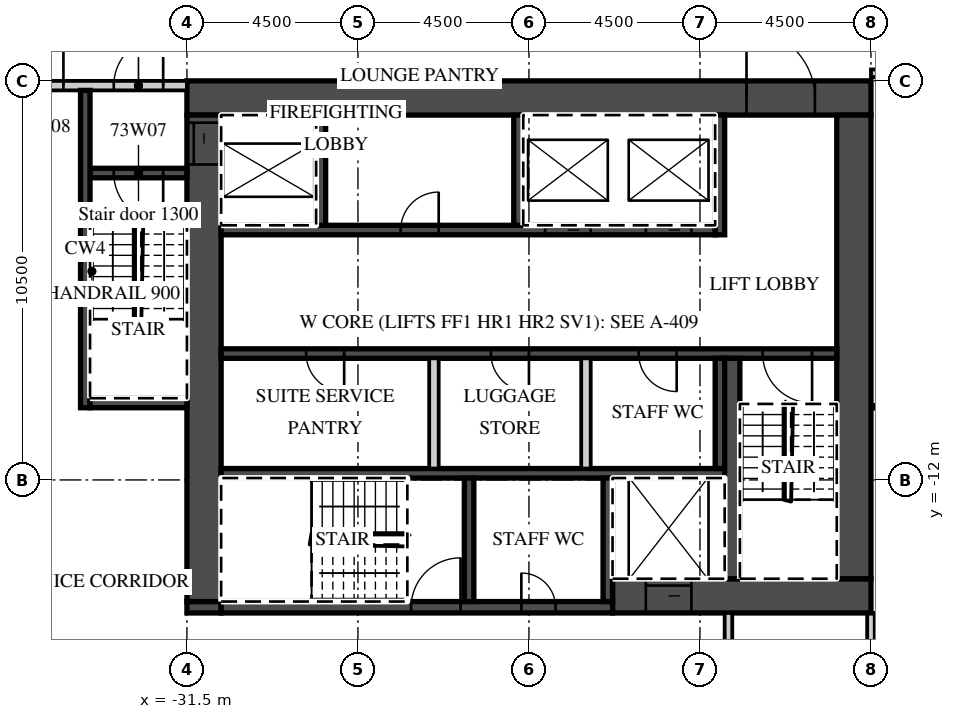
"""IFC4 building model, lengths in metres.
Left out: names, types, materials, properties, quantities, classifications, styles, units other than length and angle.
Written with IfcOpenShell. Run it as: python <this file> out.ifc"""

import sys

from ifc_helpers import new_model, si_unit, direction, frame, frame_2d, origin, place, context, subcontext, project, spatial, rectangle, extrude, element, fill, save


model = new_model("IFC4")
c1 = context("Model", 3, precision=1e-05, world=origin(), true_north=direction((0.0, 1.0)))
c2 = subcontext(c1, "Body", "Model", "MODEL_VIEW")
j1 = project(units=[si_unit("LENGTHUNIT", "METRE"), si_unit("PLANEANGLEUNIT", "RADIAN")], contexts=[c1])
p1 = place(None, origin())
s1 = spatial("IfcSite", under=j1, at=p1, CompositionType="ELEMENT")
p2 = place(p1, origin())
s2 = spatial("IfcBuilding", under=s1, at=p2, CompositionType="ELEMENT")
p3 = place(p2, frame((0.0, 0.0, 291.6)))
s3 = spatial("IfcBuildingStorey", under=s2, at=p3, CompositionType="ELEMENT", Elevation=291.6)
p4 = place(p3, frame((-13.5, -21.396, 0.0), z_axis=(0.0, 0.0, 1.0), x_axis=(0.0, 1.0, 0.0)))
e1 = element("IfcWall", 1, at=p4, inside=s3, PredefinedType="PARTITIONING", context=c2, shape_type="SweptSolid", body=[
    extrude(rectangle(XDim=5.896, YDim=0.2, at=frame_2d((2.948, 0.0))), origin(), (0.0, 0.0, 1.0), 3.02),
])
p5 = place(p3, frame((-13.5, -1.3, 0.0), z_axis=(0.0, 0.0, 1.0), x_axis=(1.0, 0.0, 0.0)))
e2 = element("IfcWall", 2, at=p5, inside=s3, PredefinedType="PARTITIONING", context=c2, shape_type="SweptSolid", body=[
    extrude(rectangle(XDim=50.293, YDim=0.2, at=frame_2d((25.146, 0.0))), origin(), (0.0, 0.0, 1.0), 3.02),
])
p6 = place(p5, frame((0.575, 0.0, 0.0)))
e3 = element("IfcOpeningElement", 3, at=p6, cuts=e2, PredefinedType="OPENING", context=c2, shape_type="SweptSolid", body=[
    extrude(rectangle(XDim=1.0, YDim=2.1, at=frame_2d((0.5, 1.05))), frame((0.0, 0.11, 0.0), z_axis=(0.0, -1.0, 0.0), x_axis=(1.0, 0.0, 0.0)), (0.0, 0.0, 1.0), 0.22),
])
p7 = place(p5, frame((9.863, 0.0, 0.0)))
e4 = element("IfcOpeningElement", 4, at=p7, cuts=e2, PredefinedType="OPENING", context=c2, shape_type="SweptSolid", body=[
    extrude(rectangle(XDim=1.2, YDim=2.1, at=frame_2d((0.6, 1.05))), frame((0.0, 0.11, 0.0), z_axis=(0.0, -1.0, 0.0), x_axis=(1.0, 0.0, 0.0)), (0.0, 0.0, 1.0), 0.22),
])
p8 = place(p5, frame((18.862, 0.0, 0.0)))
e5 = element("IfcOpeningElement", 5, at=p8, cuts=e2, PredefinedType="OPENING", context=c2, shape_type="SweptSolid", body=[
    extrude(rectangle(XDim=1.2, YDim=2.1, at=frame_2d((0.6, 1.05))), frame((0.0, 0.11, 0.0), z_axis=(0.0, -1.0, 0.0), x_axis=(1.0, 0.0, 0.0)), (0.0, 0.0, 1.0), 0.22),
])
p9 = place(p5, frame((25.45, 0.0, 0.0)))
e6 = element("IfcOpeningElement", 6, at=p9, cuts=e2, PredefinedType="OPENING", context=c2, shape_type="SweptSolid", body=[
    extrude(rectangle(XDim=1.0, YDim=2.1, at=frame_2d((0.5, 1.05))), frame((0.0, 0.11, 0.0), z_axis=(0.0, -1.0, 0.0), x_axis=(1.0, 0.0, 0.0)), (0.0, 0.0, 1.0), 0.22),
])
p10 = place(p5, frame((27.55, 0.0, 0.0)))
e7 = element("IfcOpeningElement", 7, at=p10, cuts=e2, PredefinedType="OPENING", context=c2, shape_type="SweptSolid", body=[
    extrude(rectangle(XDim=1.0, YDim=2.1, at=frame_2d((0.5, 1.05))), frame((0.0, 0.11, 0.0), z_axis=(0.0, -1.0, 0.0), x_axis=(1.0, 0.0, 0.0)), (0.0, 0.0, 1.0), 0.22),
])
p11 = place(p5, frame((33.938, 0.0, 0.0)))
e8 = element("IfcOpeningElement", 8, at=p11, cuts=e2, PredefinedType="OPENING", context=c2, shape_type="SweptSolid", body=[
    extrude(rectangle(XDim=1.2, YDim=2.1, at=frame_2d((0.6, 1.05))), frame((0.0, 0.11, 0.0), z_axis=(0.0, -1.0, 0.0), x_axis=(1.0, 0.0, 0.0)), (0.0, 0.0, 1.0), 0.22),
])
p12 = place(p5, frame((42.938, 0.0, 0.0)))
e9 = element("IfcOpeningElement", 9, at=p12, cuts=e2, PredefinedType="OPENING", context=c2, shape_type="SweptSolid", body=[
    extrude(rectangle(XDim=1.2, YDim=2.1, at=frame_2d((0.6, 1.05))), frame((0.0, 0.11, 0.0), z_axis=(0.0, -1.0, 0.0), x_axis=(1.0, 0.0, 0.0)), (0.0, 0.0, 1.0), 0.22),
])
p13 = place(p3, frame((-31.5, -1.95, 0.0), z_axis=(0.0, 0.0, 1.0), x_axis=(1.0, 0.0, 0.0)))
e10 = element("IfcWall", 10, at=p13, inside=s3, PredefinedType="SHEAR", context=c2, shape_type="SweptSolid", body=[
    extrude(rectangle(XDim=18.0, YDim=0.9, at=frame_2d((9.0, 0.0))), origin(), (0.0, 0.0, 1.0), 3.02),
])
p14 = place(p13, frame((14.725, 0.0, 0.0)))
e11 = element("IfcOpeningElement", 11, at=p14, cuts=e10, PredefinedType="OPENING", context=c2, shape_type="SweptSolid", body=[
    extrude(rectangle(XDim=1.8, YDim=2.1, at=frame_2d((0.9, 1.05))), frame((0.0, 0.46, 0.0), z_axis=(0.0, -1.0, 0.0), x_axis=(1.0, 0.0, 0.0)), (0.0, 0.0, 1.0), 0.92),
])
p15 = place(p3, frame((-20.3, -15.05, 0.0), z_axis=(0.0, 0.0, 1.0), x_axis=(1.0, 0.0, 0.0)))
e12 = element("IfcWall", 12, at=p15, inside=s3, PredefinedType="SHEAR", context=c2, shape_type="SweptSolid", body=[
    extrude(rectangle(XDim=6.8, YDim=0.9, at=frame_2d((3.4, 0.0))), origin(), (0.0, 0.0, 1.0), 3.02),
])
p16 = place(p15, frame((0.875, 0.0, 0.0)))
e13 = element("IfcOpeningElement", 13, at=p16, cuts=e12, PredefinedType="OPENING", context=c2, shape_type="SweptSolid", body=[
    extrude(rectangle(XDim=1.2, YDim=2.1, at=frame_2d((0.6, 1.05))), frame((0.0, 0.46, 0.0), z_axis=(0.0, -1.0, 0.0), x_axis=(1.0, 0.0, 0.0)), (0.0, 0.0, 1.0), 0.92),
])
p17 = place(p3, frame((-31.5, -15.35, 0.0), z_axis=(0.0, 0.0, 1.0), x_axis=(1.0, 0.0, 0.0)))
e14 = element("IfcWall", 14, at=p17, inside=s3, PredefinedType="SHEAR", context=c2, shape_type="SweptSolid", body=[
    extrude(rectangle(XDim=0.9, YDim=0.3, at=frame_2d((0.45, 0.0))), origin(), (0.0, 0.0, 1.0), 3.02),
])
p18 = place(p3, frame((-30.6, -15.35, 0.0), z_axis=(0.0, 0.0, 1.0), x_axis=(1.0, 0.0, 0.0)))
e15 = element("IfcWall", 15, at=p18, inside=s3, PredefinedType="SHEAR", context=c2, shape_type="SweptSolid", body=[
    extrude(rectangle(XDim=10.3, YDim=0.3, at=frame_2d((5.15, 0.0))), origin(), (0.0, 0.0, 1.0), 3.02),
])
p19 = place(p18, frame((5.0, 0.0, 0.0)))
e16 = element("IfcOpeningElement", 16, at=p19, cuts=e15, PredefinedType="OPENING", context=c2, shape_type="SweptSolid", body=[
    extrude(rectangle(XDim=1.3, YDim=2.1, at=frame_2d((0.65, 1.05))), frame((0.0, 0.16, 0.0), z_axis=(0.0, -1.0, 0.0), x_axis=(1.0, 0.0, 0.0)), (0.0, 0.0, 1.0), 0.32),
])
p20 = place(p18, frame((7.9, 0.0, 0.0)))
e17 = element("IfcOpeningElement", 17, at=p20, cuts=e15, PredefinedType="OPENING", context=c2, shape_type="SweptSolid", body=[
    extrude(rectangle(XDim=0.9, YDim=2.1, at=frame_2d((0.45, 1.05))), frame((0.0, 0.16, 0.0), z_axis=(0.0, -1.0, 0.0), x_axis=(1.0, 0.0, 0.0)), (0.0, 0.0, 1.0), 0.32),
])
p21 = place(p3, frame((-31.05, -15.2, 0.0), z_axis=(0.0, 0.0, 1.0), x_axis=(0.0, 1.0, 0.0)))
e18 = element("IfcWall", 18, at=p21, inside=s3, PredefinedType="SHEAR", context=c2, shape_type="SweptSolid", body=[
    extrude(rectangle(XDim=12.8, YDim=0.9, at=frame_2d((6.4, 0.0))), origin(), (0.0, 0.0, 1.0), 3.02),
])
p22 = place(p21, frame((11.5, 0.0, 0.0)))
e19 = element("IfcOpeningElement", 19, at=p22, cuts=e18, PredefinedType="OPENING", context=c2, shape_type="SweptSolid", body=[
    extrude(rectangle(XDim=1.1, YDim=2.1, at=frame_2d((0.55, 1.05))), frame((0.0, 0.46, 0.0), z_axis=(0.0, -1.0, 0.0), x_axis=(1.0, 0.0, 0.0)), (0.0, 0.0, 1.0), 0.92),
])
p23 = place(p3, frame((-13.95, -14.6, 0.0), z_axis=(0.0, 0.0, 1.0), x_axis=(0.0, 1.0, 0.0)))
e20 = element("IfcWall", 20, at=p23, inside=s3, PredefinedType="SHEAR", context=c2, shape_type="SweptSolid", body=[
    extrude(rectangle(XDim=12.2, YDim=0.9, at=frame_2d((6.1, 0.0))), origin(), (0.0, 0.0, 1.0), 3.02),
])
p24 = place(p3, frame((-30.6, -5.425, 0.0), z_axis=(0.0, 0.0, 1.0), x_axis=(1.0, 0.0, 0.0)))
e21 = element("IfcWall", 21, at=p24, inside=s3, PredefinedType="SHEAR", context=c2, shape_type="SweptSolid", body=[
    extrude(rectangle(XDim=13.0, YDim=0.25, at=frame_2d((6.5, 0.0))), origin(), (0.0, 0.0, 1.0), 3.02),
])
p25 = place(p24, frame((8.525, 0.0, 0.0)))
e22 = element("IfcOpeningElement", 22, at=p25, cuts=e21, PredefinedType="OPENING", context=c2, shape_type="SweptSolid", body=[
    extrude(rectangle(XDim=1.2, YDim=2.1, at=frame_2d((0.6, 1.05))), frame((0.0, 0.135, 0.0), z_axis=(0.0, -1.0, 0.0), x_axis=(1.0, 0.0, 0.0)), (0.0, 0.0, 1.0), 0.27),
])
p26 = place(p24, frame((11.175, 0.0, 0.0)))
e23 = element("IfcOpeningElement", 23, at=p26, cuts=e21, PredefinedType="OPENING", context=c2, shape_type="SweptSolid", body=[
    extrude(rectangle(XDim=1.2, YDim=2.1, at=frame_2d((0.6, 1.05))), frame((0.0, 0.135, 0.0), z_axis=(0.0, -1.0, 0.0), x_axis=(1.0, 0.0, 0.0)), (0.0, 0.0, 1.0), 0.27),
])
p27 = place(p24, frame((4.725, 0.0, 0.0)))
e24 = element("IfcOpeningElement", 24, at=p27, cuts=e21, PredefinedType="OPENING", context=c2, shape_type="SweptSolid", body=[
    extrude(rectangle(XDim=1.0, YDim=2.1, at=frame_2d((0.5, 1.05))), frame((0.0, 0.135, 0.0), z_axis=(0.0, -1.0, 0.0), x_axis=(1.0, 0.0, 0.0)), (0.0, 0.0, 1.0), 0.27),
])
p28 = place(p3, frame((-17.475, -5.55, 0.0), z_axis=(0.0, 0.0, 1.0), x_axis=(0.0, 1.0, 0.0)))
e25 = element("IfcWall", 25, at=p28, inside=s3, PredefinedType="SHEAR", context=c2, shape_type="SweptSolid", body=[
    extrude(rectangle(XDim=3.15, YDim=0.25, at=frame_2d((1.575, 0.0))), origin(), (0.0, 0.0, 1.0), 3.02),
])
for number, where, z_axis, x_axis in (
    (26, (-27.975, -5.3, 0.0), (0.0, 0.0, 1.0), (0.0, 1.0, 0.0)),
    (27, (-22.775, -5.3, 0.0), (0.0, 0.0, 1.0), (0.0, 1.0, 0.0)),
):
    element("IfcWall", number, at=place(p3, frame(where, z_axis=z_axis, x_axis=x_axis)), inside=s3, PredefinedType="SHEAR", context=c2, shape_type="SweptSolid", body=[
        extrude(rectangle(XDim=2.9, YDim=0.25, at=frame_2d((1.45, 0.0))), origin(), (0.0, 0.0, 1.0), 3.02),
    ])
p29 = place(p3, frame((-30.6, -8.675, 0.0), z_axis=(0.0, 0.0, 1.0), x_axis=(1.0, 0.0, 0.0)))
e28 = element("IfcWall", 28, at=p29, inside=s3, PredefinedType="SHEAR", context=c2, shape_type="SweptSolid", body=[
    extrude(rectangle(XDim=16.2, YDim=0.25, at=frame_2d((8.1, 0.0))), origin(), (0.0, 0.0, 1.0), 3.02),
])
p30 = place(p29, frame((14.25, 0.0, 0.0)))
e29 = element("IfcOpeningElement", 29, at=p30, cuts=e28, PredefinedType="OPENING", context=c2, shape_type="SweptSolid", body=[
    extrude(rectangle(XDim=1.3, YDim=2.1, at=frame_2d((0.65, 1.05))), frame((0.0, 0.135, 0.0), z_axis=(0.0, -1.0, 0.0), x_axis=(1.0, 0.0, 0.0)), (0.0, 0.0, 1.0), 0.27),
])
p31 = place(p29, frame((2.238, 0.0, 0.0)))
e30 = element("IfcOpeningElement", 30, at=p31, cuts=e28, PredefinedType="OPENING", context=c2, shape_type="SweptSolid", body=[
    extrude(rectangle(XDim=1.0, YDim=2.1, at=frame_2d((0.5, 1.05))), frame((0.0, 0.135, 0.0), z_axis=(0.0, -1.0, 0.0), x_axis=(1.0, 0.0, 0.0)), (0.0, 0.0, 1.0), 0.27),
])
p32 = place(p29, frame((7.1, 0.0, 0.0)))
e31 = element("IfcOpeningElement", 31, at=p32, cuts=e28, PredefinedType="OPENING", context=c2, shape_type="SweptSolid", body=[
    extrude(rectangle(XDim=1.0, YDim=2.1, at=frame_2d((0.5, 1.05))), frame((0.0, 0.135, 0.0), z_axis=(0.0, -1.0, 0.0), x_axis=(1.0, 0.0, 0.0)), (0.0, 0.0, 1.0), 0.27),
])
p33 = place(p29, frame((10.988, 0.0, 0.0)))
e32 = element("IfcOpeningElement", 32, at=p33, cuts=e28, PredefinedType="OPENING", context=c2, shape_type="SweptSolid", body=[
    extrude(rectangle(XDim=1.0, YDim=2.1, at=frame_2d((0.5, 1.05))), frame((0.0, 0.135, 0.0), z_axis=(0.0, -1.0, 0.0), x_axis=(1.0, 0.0, 0.0)), (0.0, 0.0, 1.0), 0.27),
])
p34 = place(p3, frame((-30.6, -11.825, 0.0), z_axis=(0.0, 0.0, 1.0), x_axis=(1.0, 0.0, 0.0)))
e33 = element("IfcWall", 33, at=p34, inside=s3, PredefinedType="SHEAR", context=c2, shape_type="SweptSolid", body=[
    extrude(rectangle(XDim=13.25, YDim=0.25, at=frame_2d((6.625, 0.0))), origin(), (0.0, 0.0, 1.0), 3.02),
])
p35 = place(p3, frame((-17.475, -11.7, 0.0), z_axis=(0.0, 0.0, 1.0), x_axis=(0.0, 1.0, 0.0)))
e34 = element("IfcWall", 34, at=p35, inside=s3, PredefinedType="SHEAR", context=c2, shape_type="SweptSolid", body=[
    extrude(rectangle(XDim=2.9, YDim=0.25, at=frame_2d((1.45, 0.0))), origin(), (0.0, 0.0, 1.0), 3.02),
])
for number, where, z_axis, x_axis in (
    (35, (-25.0, -11.7, 0.0), (0.0, 0.0, 1.0), (0.0, 1.0, 0.0)),
    (36, (-21.0, -11.7, 0.0), (0.0, 0.0, 1.0), (0.0, 1.0, 0.0)),
):
    element("IfcWall", number, at=place(p3, frame(where, z_axis=z_axis, x_axis=x_axis)), inside=s3, PredefinedType="PARTITIONING", context=c2, shape_type="SweptSolid", body=[
        extrude(rectangle(XDim=2.9, YDim=0.25, at=frame_2d((1.45, 0.0))), origin(), (0.0, 0.0, 1.0), 3.02),
    ])
p36 = place(p3, frame((-17.15, -14.6, 0.0), z_axis=(0.0, 0.0, 1.0), x_axis=(0.0, 1.0, 0.0)))
e37 = element("IfcWall", 37, at=p36, inside=s3, PredefinedType="SHEAR", context=c2, shape_type="SweptSolid", body=[
    extrude(rectangle(XDim=5.8, YDim=0.4, at=frame_2d((2.9, 0.0))), origin(), (0.0, 0.0, 1.0), 3.02),
])
for number, where, z_axis, x_axis in (
    (38, (-20.425, -15.2, 0.0), (0.0, 0.0, 1.0), (0.0, 1.0, 0.0)),
    (39, (-24.075, -15.2, 0.0), (0.0, 0.0, 1.0), (0.0, 1.0, 0.0)),
):
    element("IfcWall", number, at=place(p3, frame(where, z_axis=z_axis, x_axis=x_axis)), inside=s3, PredefinedType="SHEAR", context=c2, shape_type="SweptSolid", body=[
        extrude(rectangle(XDim=3.25, YDim=0.25, at=frame_2d((1.625, 0.0))), origin(), (0.0, 0.0, 1.0), 3.02),
    ])
p37 = place(p3, frame((-39.627, -1.625, 0.0), z_axis=(0.0, 0.0, 1.0), x_axis=(1.0, 0.0, 0.0)))
e40 = element("IfcWall", 40, at=p37, inside=s3, PredefinedType="PARTITIONING", context=c2, shape_type="SweptSolid", body=[
    extrude(rectangle(XDim=8.127, YDim=0.25, at=frame_2d((4.063, 0.0))), origin(), (0.0, 0.0, 1.0), 3.02),
])
p38 = place(p37, frame((6.202, 0.0, 0.0)))
e41 = element("IfcOpeningElement", 41, at=p38, cuts=e40, PredefinedType="OPENING", context=c2, shape_type="SweptSolid", body=[
    extrude(rectangle(XDim=1.3, YDim=2.1, at=frame_2d((0.65, 1.05))), frame((0.0, 0.135, 0.0), z_axis=(0.0, -1.0, 0.0), x_axis=(1.0, 0.0, 0.0)), (0.0, 0.0, 1.0), 0.27),
])
p39 = place(p37, frame((3.777, 0.0, 0.0)))
e42 = element("IfcOpeningElement", 42, at=p39, cuts=e40, PredefinedType="OPENING", context=c2, shape_type="SweptSolid", body=[
    extrude(rectangle(XDim=1.1, YDim=2.1, at=frame_2d((0.55, 1.05))), frame((0.0, 0.135, 0.0), z_axis=(0.0, -1.0, 0.0), x_axis=(1.0, 0.0, 0.0)), (0.0, 0.0, 1.0), 0.27),
])
p40 = place(p3, frame((-34.05, -3.925, 0.0), z_axis=(0.0, 0.0, 1.0), x_axis=(1.0, 0.0, 0.0)))
e43 = element("IfcWall", 43, at=p40, inside=s3, PredefinedType="SHEAR", context=c2, shape_type="SweptSolid", body=[
    extrude(rectangle(XDim=2.55, YDim=0.25, at=frame_2d((1.275, 0.0))), origin(), (0.0, 0.0, 1.0), 3.02),
])
p41 = place(p40, frame((0.625, 0.0, 0.0)))
e44 = element("IfcOpeningElement", 44, at=p41, cuts=e43, PredefinedType="OPENING", context=c2, shape_type="SweptSolid", body=[
    extrude(rectangle(XDim=1.3, YDim=2.1, at=frame_2d((0.65, 1.05))), frame((0.0, 0.135, 0.0), z_axis=(0.0, -1.0, 0.0), x_axis=(1.0, 0.0, 0.0)), (0.0, 0.0, 1.0), 0.27),
])
p42 = place(p3, frame((-34.175, -10.1, 0.0), z_axis=(0.0, 0.0, 1.0), x_axis=(0.0, 1.0, 0.0)))
e45 = element("IfcWall", 45, at=p42, inside=s3, PredefinedType="SHEAR", context=c2, shape_type="SweptSolid", body=[
    extrude(rectangle(XDim=8.35, YDim=0.25, at=frame_2d((4.175, 0.0))), origin(), (0.0, 0.0, 1.0), 3.02),
])
p43 = place(p3, frame((-34.05, -9.975, 0.0), z_axis=(0.0, 0.0, 1.0), x_axis=(1.0, 0.0, 0.0)))
e46 = element("IfcWall", 46, at=p43, inside=s3, PredefinedType="SHEAR", context=c2, shape_type="SweptSolid", body=[
    extrude(rectangle(XDim=2.55, YDim=0.25, at=frame_2d((1.275, 0.0))), origin(), (0.0, 0.0, 1.0), 3.02),
])
p44 = place(p3, frame((-17.25, -17.7, 0.0), z_axis=(0.0, 0.0, 1.0), x_axis=(0.0, 1.0, 0.0)))
e47 = element("IfcWall", 47, at=p44, inside=s3, PredefinedType="PARTITIONING", context=c2, shape_type="SweptSolid", body=[
    extrude(rectangle(XDim=2.2, YDim=0.2, at=frame_2d((1.1, 0.0))), origin(), (0.0, 0.0, 1.0), 3.02),
])
p45 = place(p25, origin())
e48 = element("IfcDoor", 48, at=p45, inside=s3, OperationType="SLIDING_TO_LEFT", PredefinedType="DOOR", context=c2, shape_type="SweptSolid", body=[
    extrude(rectangle(XDim=1.2, YDim=2.1, at=frame_2d((0.6, 1.05))), frame((0.0, 0.025, 0.0), z_axis=(0.0, -1.0, 0.0), x_axis=(1.0, 0.0, 0.0)), (0.0, 0.0, 1.0), 0.05),
])
fill(e22, e48)
p46 = place(p26, origin())
e49 = element("IfcDoor", 49, at=p46, inside=s3, OperationType="SLIDING_TO_RIGHT", PredefinedType="DOOR", context=c2, shape_type="SweptSolid", body=[
    extrude(rectangle(XDim=1.2, YDim=2.1, at=frame_2d((0.6, 1.05))), frame((0.0, 0.025, 0.0), z_axis=(0.0, -1.0, 0.0), x_axis=(1.0, 0.0, 0.0)), (0.0, 0.0, 1.0), 0.05),
])
fill(e23, e49)
p47 = place(p16, origin())
e50 = element("IfcDoor", 50, at=p47, inside=s3, OperationType="SLIDING_TO_LEFT", PredefinedType="DOOR", context=c2, shape_type="SweptSolid", body=[
    extrude(rectangle(XDim=1.2, YDim=2.1, at=frame_2d((0.6, 1.05))), frame((0.0, 0.025, 0.0), z_axis=(0.0, -1.0, 0.0), x_axis=(1.0, 0.0, 0.0)), (0.0, 0.0, 1.0), 0.05),
])
fill(e13, e50)
p48 = place(p22, origin())
e51 = element("IfcDoor", 51, at=p48, inside=s3, OperationType="SLIDING_TO_RIGHT", PredefinedType="DOOR", context=c2, shape_type="SweptSolid", body=[
    extrude(rectangle(XDim=1.1, YDim=2.1, at=frame_2d((0.55, 1.05))), frame((0.0, 0.025, 0.0), z_axis=(0.0, -1.0, 0.0), x_axis=(1.0, 0.0, 0.0)), (0.0, 0.0, 1.0), 0.05),
])
fill(e19, e51)
p49 = place(p14, origin())
e52 = element("IfcDoor", 52, at=p49, inside=s3, OperationType="DOUBLE_DOOR_DOUBLE_SWING", PredefinedType="DOOR", context=c2, shape_type="SweptSolid", body=[
    extrude(rectangle(XDim=1.8, YDim=2.1, at=frame_2d((0.9, 1.05))), frame((0.0, 0.025, 0.0), z_axis=(0.0, -1.0, 0.0), x_axis=(1.0, 0.0, 0.0)), (0.0, 0.0, 1.0), 0.05),
])
fill(e11, e52)
p50 = place(p38, origin())
e53 = element("IfcDoor", 53, at=p50, inside=s3, OperationType="SINGLE_SWING_RIGHT", PredefinedType="DOOR", context=c2, shape_type="SweptSolid", body=[
    extrude(rectangle(XDim=1.3, YDim=2.1, at=frame_2d((0.65, 1.05))), frame((0.0, 0.025, 0.0), z_axis=(0.0, -1.0, 0.0), x_axis=(1.0, 0.0, 0.0)), (0.0, 0.0, 1.0), 0.05),
])
fill(e41, e53)
p51 = place(p41, origin())
e54 = element("IfcDoor", 54, at=p51, inside=s3, OperationType="SINGLE_SWING_RIGHT", PredefinedType="DOOR", context=c2, shape_type="SweptSolid", body=[
    extrude(rectangle(XDim=1.3, YDim=2.1, at=frame_2d((0.65, 1.05))), frame((0.0, 0.025, 0.0), z_axis=(0.0, -1.0, 0.0), x_axis=(1.0, 0.0, 0.0)), (0.0, 0.0, 1.0), 0.05),
])
fill(e44, e54)
p52 = place(p39, origin())
e55 = element("IfcDoor", 55, at=p52, inside=s3, OperationType="SINGLE_SWING_RIGHT", PredefinedType="DOOR", context=c2, shape_type="SweptSolid", body=[
    extrude(rectangle(XDim=1.1, YDim=2.1, at=frame_2d((0.55, 1.05))), frame((0.0, 0.025, 0.0), z_axis=(0.0, -1.0, 0.0), x_axis=(1.0, 0.0, 0.0)), (0.0, 0.0, 1.0), 0.05),
])
fill(e42, e55)
p53 = place(p30, origin())
e56 = element("IfcDoor", 56, at=p53, inside=s3, OperationType="SINGLE_SWING_RIGHT", PredefinedType="DOOR", context=c2, shape_type="SweptSolid", body=[
    extrude(rectangle(XDim=1.3, YDim=2.1, at=frame_2d((0.65, 1.05))), frame((0.0, 0.025, 0.0), z_axis=(0.0, -1.0, 0.0), x_axis=(1.0, 0.0, 0.0)), (0.0, 0.0, 1.0), 0.05),
])
fill(e29, e56)
p54 = place(p19, origin())
e57 = element("IfcDoor", 57, at=p54, inside=s3, OperationType="SINGLE_SWING_RIGHT", PredefinedType="DOOR", context=c2, shape_type="SweptSolid", body=[
    extrude(rectangle(XDim=1.3, YDim=2.1, at=frame_2d((0.65, 1.05))), frame((0.0, 0.025, 0.0), z_axis=(0.0, -1.0, 0.0), x_axis=(1.0, 0.0, 0.0)), (0.0, 0.0, 1.0), 0.05),
])
fill(e16, e57)
p55 = place(p20, origin())
e58 = element("IfcDoor", 58, at=p55, inside=s3, OperationType="SINGLE_SWING_LEFT", PredefinedType="DOOR", context=c2, shape_type="SweptSolid", body=[
    extrude(rectangle(XDim=0.9, YDim=2.1, at=frame_2d((0.45, 1.05))), frame((0.0, 0.025, 0.0), z_axis=(0.0, -1.0, 0.0), x_axis=(1.0, 0.0, 0.0)), (0.0, 0.0, 1.0), 0.05),
])
fill(e17, e58)
p56 = place(p31, origin())
e59 = element("IfcDoor", 59, at=p56, inside=s3, OperationType="SINGLE_SWING_RIGHT", PredefinedType="DOOR", context=c2, shape_type="SweptSolid", body=[
    extrude(rectangle(XDim=1.0, YDim=2.1, at=frame_2d((0.5, 1.05))), frame((0.0, 0.025, 0.0), z_axis=(0.0, -1.0, 0.0), x_axis=(1.0, 0.0, 0.0)), (0.0, 0.0, 1.0), 0.05),
])
fill(e30, e59)
p57 = place(p32, origin())
e60 = element("IfcDoor", 60, at=p57, inside=s3, OperationType="SINGLE_SWING_RIGHT", PredefinedType="DOOR", context=c2, shape_type="SweptSolid", body=[
    extrude(rectangle(XDim=1.0, YDim=2.1, at=frame_2d((0.5, 1.05))), frame((0.0, 0.025, 0.0), z_axis=(0.0, -1.0, 0.0), x_axis=(1.0, 0.0, 0.0)), (0.0, 0.0, 1.0), 0.05),
])
fill(e31, e60)
p58 = place(p33, origin())
e61 = element("IfcDoor", 61, at=p58, inside=s3, OperationType="SINGLE_SWING_RIGHT", PredefinedType="DOOR", context=c2, shape_type="SweptSolid", body=[
    extrude(rectangle(XDim=1.0, YDim=2.1, at=frame_2d((0.5, 1.05))), frame((0.0, 0.025, 0.0), z_axis=(0.0, -1.0, 0.0), x_axis=(1.0, 0.0, 0.0)), (0.0, 0.0, 1.0), 0.05),
])
fill(e32, e61)
p59 = place(p27, origin())
e62 = element("IfcDoor", 62, at=p59, inside=s3, OperationType="SINGLE_SWING_RIGHT", PredefinedType="DOOR", context=c2, shape_type="SweptSolid", body=[
    extrude(rectangle(XDim=1.0, YDim=2.1, at=frame_2d((0.5, 1.05))), frame((0.0, 0.025, 0.0), z_axis=(0.0, -1.0, 0.0), x_axis=(1.0, 0.0, 0.0)), (0.0, 0.0, 1.0), 0.05),
])
fill(e24, e62)
save(model, sys.argv[1])
